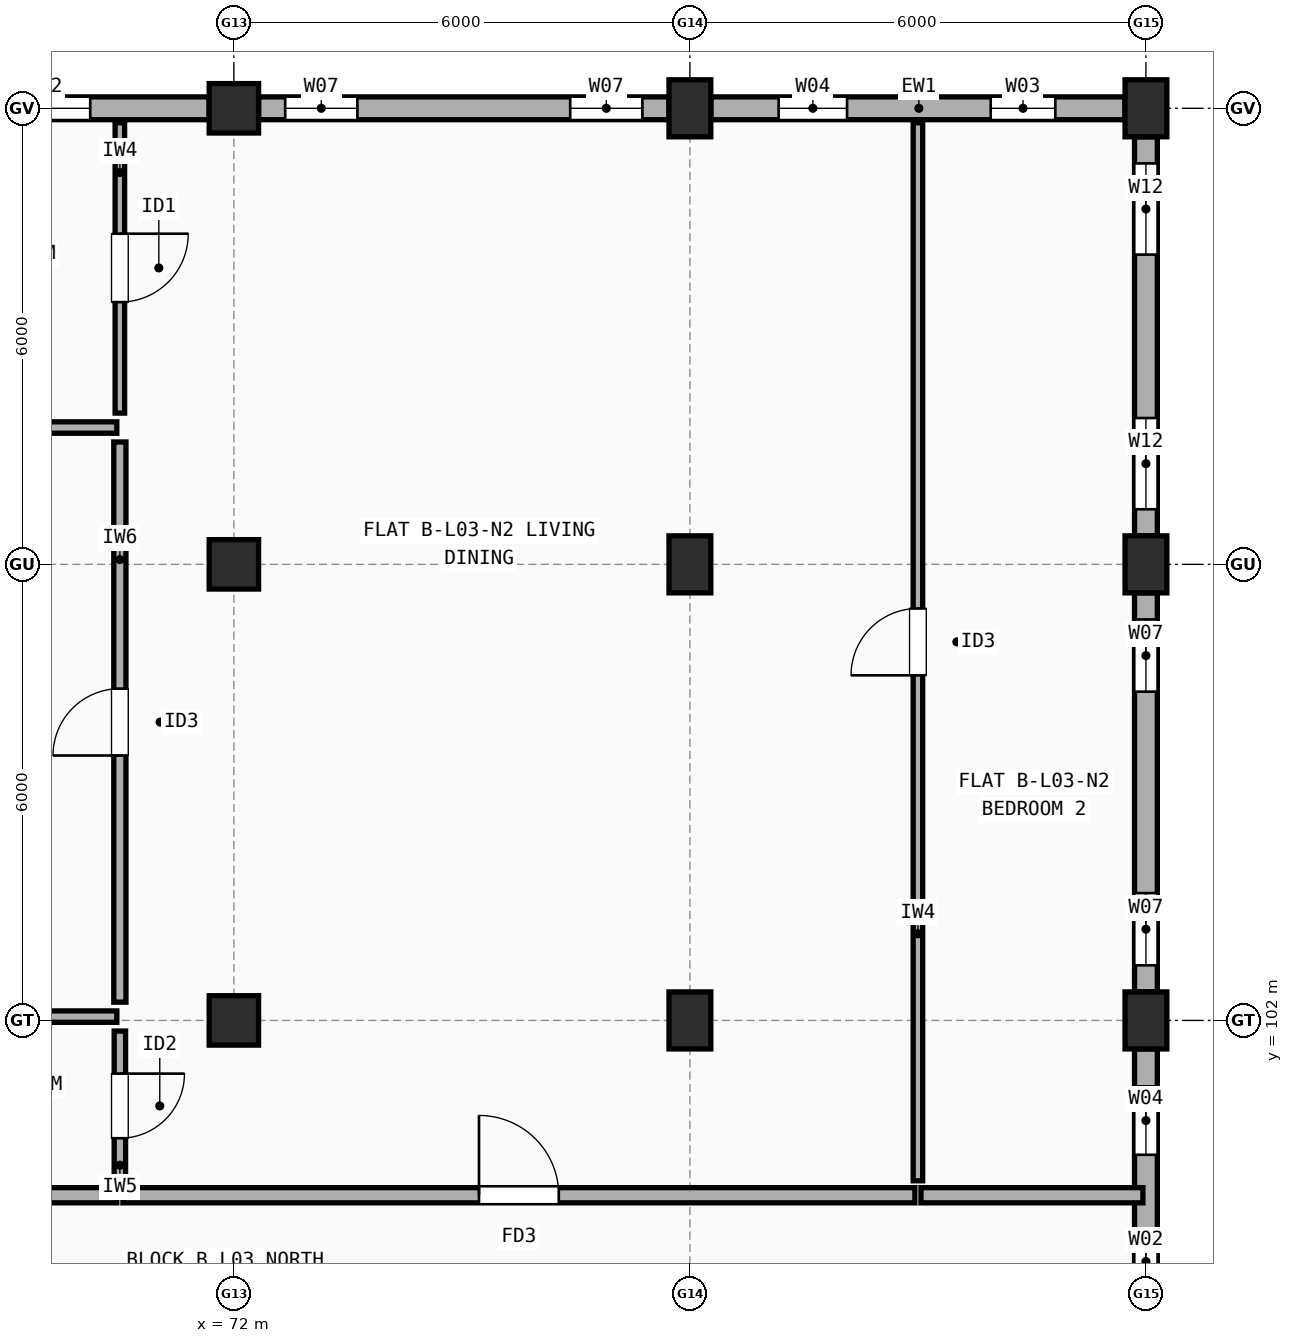
"""IFC4 building model, lengths in metres.
Left out: names, types, materials, properties, quantities, classifications, styles, units other than length and angle.
Written with IfcOpenShell. Run it as: python <this file> out.ifc"""

import sys

from ifc_helpers import new_model, si_unit, direction, frame, frame_2d, origin, origin_2d, place, context, subcontext, project, spatial, rectangle, extrude, element, fill, save


model = new_model("IFC4")
c1 = context("Model", 3, precision=1e-05, world=origin(), true_north=direction((0.0, 1.0)))
c2 = subcontext(c1, "Body", "Model", "MODEL_VIEW")
j1 = project(units=[si_unit("LENGTHUNIT", "METRE"), si_unit("PLANEANGLEUNIT", "RADIAN")], contexts=[c1])
p1 = place(None, origin())
s1 = spatial("IfcSite", under=j1, at=p1, CompositionType="ELEMENT")
p2 = place(p1, origin())
s2 = spatial("IfcBuilding", under=s1, at=p2, CompositionType="ELEMENT")
p3 = place(p2, frame((0.0, 0.0, 10.9)))
s3 = spatial("IfcBuildingStorey", under=s2, at=p3, CompositionType="ELEMENT", Elevation=10.9)
for number, where, z_axis, x_axis in (
    (1, (72.0, 102.0, 0.0), (0.0, 0.0, 1.0), (1.0, 0.0, 0.0)),
    (2, (72.0, 108.0, 0.0), (0.0, 0.0, 1.0), (1.0, 0.0, 0.0)),
    (3, (72.0, 114.0, 0.0), (0.0, 0.0, 1.0), (1.0, 0.0, 0.0)),
):
    element("IfcColumn", number, at=place(p3, frame(where, z_axis=z_axis, x_axis=x_axis)), inside=s3, PredefinedType="COLUMN", context=c2, shape_type="SweptSolid", body=[
        extrude(rectangle(XDim=0.65, YDim=0.65, at=origin_2d()), origin(), (0.0, 0.0, 1.0), 2.96),
    ])
for number, where, z_axis, x_axis in (
    (4, (78.0, 102.0, 0.0), (0.0, 0.0, 1.0), (1.0, 0.0, 0.0)),
    (5, (78.0, 108.0, 0.0), (0.0, 0.0, 1.0), (1.0, 0.0, 0.0)),
    (6, (78.0, 114.0, 0.0), (0.0, 0.0, 1.0), (1.0, 0.0, 0.0)),
    (7, (84.0, 102.0, 0.0), (0.0, 0.0, 1.0), (1.0, 0.0, 0.0)),
    (8, (84.0, 108.0, 0.0), (0.0, 0.0, 1.0), (1.0, 0.0, 0.0)),
    (9, (84.0, 114.0, 0.0), (0.0, 0.0, 1.0), (1.0, 0.0, 0.0)),
):
    element("IfcColumn", number, at=place(p3, frame(where, z_axis=z_axis, x_axis=x_axis)), inside=s3, PredefinedType="COLUMN", context=c2, shape_type="SweptSolid", body=[
        extrude(rectangle(XDim=0.55, YDim=0.75, at=origin_2d()), origin(), (0.0, 0.0, 1.0), 2.96),
    ])
p4 = place(p3, frame((84.0, 96.375, 0.0), z_axis=(0.0, 0.0, 1.0), x_axis=(0.0, 1.0, 0.0)))
e10 = element("IfcWall", 10, at=p4, inside=s3, PredefinedType="STANDARD", context=c2, shape_type="SweptSolid", body=[
    extrude(rectangle(XDim=5.25, YDim=0.3, at=frame_2d((2.625, 0.0))), origin(), (0.0, 0.0, 1.0), 2.442),
])
p5 = place(p4, frame((2.054, 0.0, 0.9)))
e11 = element("IfcOpeningElement", 11, at=p5, cuts=e10, PredefinedType="OPENING", context=c2, shape_type="SweptSolid", body=[
    extrude(rectangle(XDim=0.8, YDim=1.2, at=frame_2d((0.4, 0.6))), frame((0.0, 0.16, 0.0), z_axis=(0.0, -1.0, 0.0), x_axis=(1.0, 0.0, 0.0)), (0.0, 0.0, 1.0), 0.32),
])
p6 = place(p4, frame((3.857, 0.0, 0.9)))
e12 = element("IfcOpeningElement", 12, at=p6, cuts=e10, PredefinedType="OPENING", context=c2, shape_type="SweptSolid", body=[
    extrude(rectangle(XDim=0.9, YDim=1.3, at=frame_2d((0.45, 0.65))), frame((0.0, 0.16, 0.0), z_axis=(0.0, -1.0, 0.0), x_axis=(1.0, 0.0, 0.0)), (0.0, 0.0, 1.0), 0.32),
])
p7 = place(p3, frame((84.0, 102.375, 0.0), z_axis=(0.0, 0.0, 1.0), x_axis=(0.0, 1.0, 0.0)))
e13 = element("IfcWall", 13, at=p7, inside=s3, PredefinedType="STANDARD", context=c2, shape_type="SweptSolid", body=[
    extrude(rectangle(XDim=5.25, YDim=0.3, at=frame_2d((2.625, 0.0))), origin(), (0.0, 0.0, 1.0), 2.442),
])
p8 = place(p7, frame((0.35, 0.0, 0.9)))
e14 = element("IfcOpeningElement", 14, at=p8, cuts=e13, PredefinedType="OPENING", context=c2, shape_type="SweptSolid", body=[
    extrude(rectangle(XDim=0.95, YDim=1.35, at=frame_2d((0.475, 0.675))), frame((0.0, 0.16, 0.0), z_axis=(0.0, -1.0, 0.0), x_axis=(1.0, 0.0, 0.0)), (0.0, 0.0, 1.0), 0.32),
])
p9 = place(p7, frame((3.95, 0.0, 0.9)))
e15 = element("IfcOpeningElement", 15, at=p9, cuts=e13, PredefinedType="OPENING", context=c2, shape_type="SweptSolid", body=[
    extrude(rectangle(XDim=0.95, YDim=1.35, at=frame_2d((0.475, 0.675))), frame((0.0, 0.16, 0.0), z_axis=(0.0, -1.0, 0.0), x_axis=(1.0, 0.0, 0.0)), (0.0, 0.0, 1.0), 0.32),
])
p10 = place(p3, frame((84.0, 108.375, 0.0), z_axis=(0.0, 0.0, 1.0), x_axis=(0.0, 1.0, 0.0)))
e16 = element("IfcWall", 16, at=p10, inside=s3, PredefinedType="STANDARD", context=c2, shape_type="SweptSolid", body=[
    extrude(rectangle(XDim=5.25, YDim=0.3, at=frame_2d((2.625, 0.0))), origin(), (0.0, 0.0, 1.0), 2.442),
])
p11 = place(p10, frame((0.35, 0.0, 0.9)))
e17 = element("IfcOpeningElement", 17, at=p11, cuts=e16, PredefinedType="OPENING", context=c2, shape_type="SweptSolid", body=[
    extrude(rectangle(XDim=1.2, YDim=1.35, at=frame_2d((0.6, 0.675))), frame((0.0, 0.16, 0.0), z_axis=(0.0, -1.0, 0.0), x_axis=(1.0, 0.0, 0.0)), (0.0, 0.0, 1.0), 0.32),
])
p12 = place(p10, frame((3.7, 0.0, 0.9)))
e18 = element("IfcOpeningElement", 18, at=p12, cuts=e16, PredefinedType="OPENING", context=c2, shape_type="SweptSolid", body=[
    extrude(rectangle(XDim=1.2, YDim=1.35, at=frame_2d((0.6, 0.675))), frame((0.0, 0.16, 0.0), z_axis=(0.0, -1.0, 0.0), x_axis=(1.0, 0.0, 0.0)), (0.0, 0.0, 1.0), 0.32),
])
p13 = place(p3, frame((83.725, 114.0, 0.0), z_axis=(0.0, 0.0, 1.0), x_axis=(-1.0, 0.0, 0.0)))
e19 = element("IfcWall", 19, at=p13, inside=s3, PredefinedType="STANDARD", context=c2, shape_type="SweptSolid", body=[
    extrude(rectangle(XDim=5.45, YDim=0.3, at=frame_2d((2.725, 0.0))), origin(), (0.0, 0.0, 1.0), 2.442),
])
p14 = place(p13, frame((0.917, 0.0, 0.9)))
e20 = element("IfcOpeningElement", 20, at=p14, cuts=e19, PredefinedType="OPENING", context=c2, shape_type="SweptSolid", body=[
    extrude(rectangle(XDim=0.85, YDim=1.25, at=frame_2d((0.425, 0.625))), frame((0.0, 0.16, 0.0), z_axis=(0.0, -1.0, 0.0), x_axis=(1.0, 0.0, 0.0)), (0.0, 0.0, 1.0), 0.32),
])
p15 = place(p13, frame((3.657, 0.0, 0.9)))
e21 = element("IfcOpeningElement", 21, at=p15, cuts=e19, PredefinedType="OPENING", context=c2, shape_type="SweptSolid", body=[
    extrude(rectangle(XDim=0.9, YDim=1.3, at=frame_2d((0.45, 0.65))), frame((0.0, 0.16, 0.0), z_axis=(0.0, -1.0, 0.0), x_axis=(1.0, 0.0, 0.0)), (0.0, 0.0, 1.0), 0.32),
])
p16 = place(p3, frame((77.725, 114.0, 0.0), z_axis=(0.0, 0.0, 1.0), x_axis=(-1.0, 0.0, 0.0)))
e22 = element("IfcWall", 22, at=p16, inside=s3, PredefinedType="STANDARD", context=c2, shape_type="SweptSolid", body=[
    extrude(rectangle(XDim=5.4, YDim=0.3, at=frame_2d((2.7, 0.0))), origin(), (0.0, 0.0, 1.0), 2.442),
])
p17 = place(p16, frame((0.35, 0.0, 0.9)))
e23 = element("IfcOpeningElement", 23, at=p17, cuts=e22, PredefinedType="OPENING", context=c2, shape_type="SweptSolid", body=[
    extrude(rectangle(XDim=0.95, YDim=1.35, at=frame_2d((0.475, 0.675))), frame((0.0, 0.16, 0.0), z_axis=(0.0, -1.0, 0.0), x_axis=(1.0, 0.0, 0.0)), (0.0, 0.0, 1.0), 0.32),
])
p18 = place(p16, frame((4.1, 0.0, 0.9)))
e24 = element("IfcOpeningElement", 24, at=p18, cuts=e22, PredefinedType="OPENING", context=c2, shape_type="SweptSolid", body=[
    extrude(rectangle(XDim=0.95, YDim=1.35, at=frame_2d((0.475, 0.675))), frame((0.0, 0.16, 0.0), z_axis=(0.0, -1.0, 0.0), x_axis=(1.0, 0.0, 0.0)), (0.0, 0.0, 1.0), 0.32),
])
p19 = place(p3, frame((71.675, 114.0, 0.0), z_axis=(0.0, 0.0, 1.0), x_axis=(-1.0, 0.0, 0.0)))
e25 = element("IfcWall", 25, at=p19, inside=s3, PredefinedType="STANDARD", context=c2, shape_type="SweptSolid", body=[
    extrude(rectangle(XDim=5.35, YDim=0.3, at=frame_2d((2.675, 0.0))), origin(), (0.0, 0.0, 1.0), 2.442),
])
p20 = place(p19, frame((1.565, 0.0, 0.9)))
e26 = element("IfcOpeningElement", 26, at=p20, cuts=e25, PredefinedType="OPENING", context=c2, shape_type="SweptSolid", body=[
    extrude(rectangle(XDim=1.2, YDim=1.35, at=frame_2d((0.6, 0.675))), frame((0.0, 0.16, 0.0), z_axis=(0.0, -1.0, 0.0), x_axis=(1.0, 0.0, 0.0)), (0.0, 0.0, 1.0), 0.32),
])
p21 = place(p19, frame((3.8, 0.0, 0.9)))
e27 = element("IfcOpeningElement", 27, at=p21, cuts=e25, PredefinedType="OPENING", context=c2, shape_type="SweptSolid", body=[
    extrude(rectangle(XDim=1.2, YDim=1.35, at=frame_2d((0.6, 0.675))), frame((0.0, 0.16, 0.0), z_axis=(0.0, -1.0, 0.0), x_axis=(1.0, 0.0, 0.0)), (0.0, 0.0, 1.0), 0.32),
])
p22 = place(p3, frame((66.04, 99.7, 0.0), z_axis=(0.0, 0.0, 1.0), x_axis=(1.0, 0.0, 0.0)))
e28 = element("IfcWall", 28, at=p22, inside=s3, PredefinedType="SOLIDWALL", context=c2, shape_type="SweptSolid", body=[
    extrude(rectangle(XDim=4.42, YDim=0.2, at=frame_2d((2.21, 0.0))), origin(), (0.0, 0.0, 1.0), 2.96),
])
p23 = place(p3, frame((70.54, 99.7, 0.0), z_axis=(0.0, 0.0, 1.0), x_axis=(1.0, 0.0, 0.0)))
e29 = element("IfcWall", 29, at=p23, inside=s3, PredefinedType="SOLIDWALL", context=c2, shape_type="SweptSolid", body=[
    extrude(rectangle(XDim=10.42, YDim=0.2, at=frame_2d((5.21, 0.0))), origin(), (0.0, 0.0, 1.0), 2.442),
])
p24 = place(p23, frame((4.685, 0.0, 0.0)))
e30 = element("IfcOpeningElement", 30, at=p24, cuts=e29, PredefinedType="OPENING", context=c2, shape_type="SweptSolid", body=[
    extrude(rectangle(XDim=1.05, YDim=2.15, at=frame_2d((0.525, 1.075))), frame((0.0, 0.11, 0.0), z_axis=(0.0, -1.0, 0.0), x_axis=(1.0, 0.0, 0.0)), (0.0, 0.0, 1.0), 0.22),
])
p25 = place(p3, frame((70.5, 109.99, 0.0), z_axis=(0.0, 0.0, 1.0), x_axis=(0.0, 1.0, 0.0)))
e31 = element("IfcWall", 31, at=p25, inside=s3, PredefinedType="PARTITIONING", context=c2, shape_type="SweptSolid", body=[
    extrude(rectangle(XDim=3.82, YDim=0.125, at=frame_2d((1.91, 0.0))), origin(), (0.0, 0.0, 1.0), 2.96),
])
p26 = place(p25, frame((1.46, 0.0, 0.0)))
e32 = element("IfcOpeningElement", 32, at=p26, cuts=e31, PredefinedType="OPENING", context=c2, shape_type="SweptSolid", body=[
    extrude(rectangle(XDim=0.9, YDim=2.1, at=frame_2d((0.45, 1.05))), frame((0.0, 0.073, 0.0), z_axis=(0.0, -1.0, 0.0), x_axis=(1.0, 0.0, 0.0)), (0.0, 0.0, 1.0), 0.145),
])
p27 = place(p3, frame((70.5, 102.24, 0.0), z_axis=(0.0, 0.0, 1.0), x_axis=(0.0, 1.0, 0.0)))
e33 = element("IfcWall", 33, at=p27, inside=s3, PredefinedType="PLUMBINGWALL", context=c2, shape_type="SweptSolid", body=[
    extrude(rectangle(XDim=7.37, YDim=0.16, at=frame_2d((3.685, 0.0))), origin(), (0.0, 0.0, 1.0), 2.442),
])
p28 = place(p27, frame((3.245, 0.0, 0.0)))
e34 = element("IfcOpeningElement", 34, at=p28, cuts=e33, PredefinedType="OPENING", context=c2, shape_type="SweptSolid", body=[
    extrude(rectangle(XDim=0.88, YDim=2.1, at=frame_2d((0.44, 1.05))), frame((0.0, 0.09, 0.0), z_axis=(0.0, -1.0, 0.0), x_axis=(1.0, 0.0, 0.0)), (0.0, 0.0, 1.0), 0.18),
])
p29 = place(p3, frame((70.5, 99.89, 0.0), z_axis=(0.0, 0.0, 1.0), x_axis=(0.0, 1.0, 0.0)))
e35 = element("IfcWall", 35, at=p29, inside=s3, PredefinedType="PARTITIONING", context=c2, shape_type="SweptSolid", body=[
    extrude(rectangle(XDim=1.97, YDim=0.15, at=frame_2d((0.985, 0.0))), origin(), (0.0, 0.0, 1.0), 2.96),
])
p30 = place(p29, frame((0.56, 0.0, 0.0)))
e36 = element("IfcOpeningElement", 36, at=p30, cuts=e35, PredefinedType="OPENING", context=c2, shape_type="SweptSolid", body=[
    extrude(rectangle(XDim=0.85, YDim=2.1, at=frame_2d((0.425, 1.05))), frame((0.0, 0.085, 0.0), z_axis=(0.0, -1.0, 0.0), x_axis=(1.0, 0.0, 0.0)), (0.0, 0.0, 1.0), 0.17),
])
p31 = place(p3, frame((66.04, 109.8, 0.0), z_axis=(0.0, 0.0, 1.0), x_axis=(1.0, 0.0, 0.0)))
e37 = element("IfcWall", 37, at=p31, inside=s3, PredefinedType="PARTITIONING", context=c2, shape_type="SweptSolid", body=[
    extrude(rectangle(XDim=4.42, YDim=0.15, at=frame_2d((2.21, 0.0))), origin(), (0.0, 0.0, 1.0), 2.458),
])
p32 = place(p3, frame((66.36, 102.05, 0.0), z_axis=(0.0, 0.0, 1.0), x_axis=(1.0, 0.0, 0.0)))
e38 = element("IfcWall", 38, at=p32, inside=s3, PredefinedType="PARTITIONING", context=c2, shape_type="SweptSolid", body=[
    extrude(rectangle(XDim=4.1, YDim=0.15, at=frame_2d((2.05, 0.0))), origin(), (0.0, 0.0, 1.0), 2.442),
])
p33 = place(p3, frame((81.04, 99.7, 0.0), z_axis=(0.0, 0.0, 1.0), x_axis=(1.0, 0.0, 0.0)))
e39 = element("IfcWall", 39, at=p33, inside=s3, PredefinedType="SOLIDWALL", context=c2, shape_type="SweptSolid", body=[
    extrude(rectangle(XDim=2.92, YDim=0.2, at=frame_2d((1.46, 0.0))), origin(), (0.0, 0.0, 1.0), 2.442),
])
p34 = place(p3, frame((81.0, 99.89, 0.0), z_axis=(0.0, 0.0, 1.0), x_axis=(0.0, 1.0, 0.0)))
e40 = element("IfcWall", 40, at=p34, inside=s3, PredefinedType="PARTITIONING", context=c2, shape_type="SweptSolid", body=[
    extrude(rectangle(XDim=13.92, YDim=0.125, at=frame_2d((6.96, 0.0))), origin(), (0.0, 0.0, 1.0), 2.442),
])
p35 = place(p34, frame((6.65, 0.0, 0.0)))
e41 = element("IfcOpeningElement", 41, at=p35, cuts=e40, PredefinedType="OPENING", context=c2, shape_type="SweptSolid", body=[
    extrude(rectangle(XDim=0.88, YDim=2.1, at=frame_2d((0.44, 1.05))), frame((0.0, 0.073, 0.0), z_axis=(0.0, -1.0, 0.0), x_axis=(1.0, 0.0, 0.0)), (0.0, 0.0, 1.0), 0.145),
])
p36 = place(p5, origin())
e42 = element("IfcWindow", 42, at=p36, inside=s3, PartitioningType="SINGLE_PANEL", PredefinedType="WINDOW", context=c2, shape_type="SweptSolid", body=[
    extrude(rectangle(XDim=0.8, YDim=1.2, at=frame_2d((0.4, 0.6))), frame((0.0, 0.03, 0.0), z_axis=(0.0, -1.0, 0.0), x_axis=(1.0, 0.0, 0.0)), (0.0, 0.0, 1.0), 0.06),
])
fill(e11, e42)
p37 = place(p6, origin())
e43 = element("IfcWindow", 43, at=p37, inside=s3, PartitioningType="SINGLE_PANEL", PredefinedType="WINDOW", context=c2, shape_type="SweptSolid", body=[
    extrude(rectangle(XDim=0.9, YDim=1.3, at=frame_2d((0.45, 0.65))), frame((0.0, 0.03, 0.0), z_axis=(0.0, -1.0, 0.0), x_axis=(1.0, 0.0, 0.0)), (0.0, 0.0, 1.0), 0.06),
])
fill(e12, e43)
p38 = place(p8, origin())
e44 = element("IfcWindow", 44, at=p38, inside=s3, PartitioningType="SINGLE_PANEL", PredefinedType="WINDOW", context=c2, shape_type="SweptSolid", body=[
    extrude(rectangle(XDim=0.95, YDim=1.35, at=frame_2d((0.475, 0.675))), frame((0.0, 0.03, 0.0), z_axis=(0.0, -1.0, 0.0), x_axis=(1.0, 0.0, 0.0)), (0.0, 0.0, 1.0), 0.06),
])
fill(e14, e44)
p39 = place(p9, origin())
e45 = element("IfcWindow", 45, at=p39, inside=s3, PartitioningType="SINGLE_PANEL", PredefinedType="WINDOW", context=c2, shape_type="SweptSolid", body=[
    extrude(rectangle(XDim=0.95, YDim=1.35, at=frame_2d((0.475, 0.675))), frame((0.0, 0.03, 0.0), z_axis=(0.0, -1.0, 0.0), x_axis=(1.0, 0.0, 0.0)), (0.0, 0.0, 1.0), 0.06),
])
fill(e15, e45)
p40 = place(p11, origin())
e46 = element("IfcWindow", 46, at=p40, inside=s3, PartitioningType="SINGLE_PANEL", PredefinedType="WINDOW", context=c2, shape_type="SweptSolid", body=[
    extrude(rectangle(XDim=1.2, YDim=1.35, at=frame_2d((0.6, 0.675))), frame((0.0, 0.03, 0.0), z_axis=(0.0, -1.0, 0.0), x_axis=(1.0, 0.0, 0.0)), (0.0, 0.0, 1.0), 0.06),
])
fill(e17, e46)
p41 = place(p12, origin())
e47 = element("IfcWindow", 47, at=p41, inside=s3, PartitioningType="SINGLE_PANEL", PredefinedType="WINDOW", context=c2, shape_type="SweptSolid", body=[
    extrude(rectangle(XDim=1.2, YDim=1.35, at=frame_2d((0.6, 0.675))), frame((0.0, 0.03, 0.0), z_axis=(0.0, -1.0, 0.0), x_axis=(1.0, 0.0, 0.0)), (0.0, 0.0, 1.0), 0.06),
])
fill(e18, e47)
p42 = place(p14, origin())
e48 = element("IfcWindow", 48, at=p42, inside=s3, PartitioningType="SINGLE_PANEL", PredefinedType="WINDOW", context=c2, shape_type="SweptSolid", body=[
    extrude(rectangle(XDim=0.85, YDim=1.25, at=frame_2d((0.425, 0.625))), frame((0.0, 0.03, 0.0), z_axis=(0.0, -1.0, 0.0), x_axis=(1.0, 0.0, 0.0)), (0.0, 0.0, 1.0), 0.06),
])
fill(e20, e48)
p43 = place(p15, origin())
e49 = element("IfcWindow", 49, at=p43, inside=s3, PartitioningType="SINGLE_PANEL", PredefinedType="WINDOW", context=c2, shape_type="SweptSolid", body=[
    extrude(rectangle(XDim=0.9, YDim=1.3, at=frame_2d((0.45, 0.65))), frame((0.0, 0.03, 0.0), z_axis=(0.0, -1.0, 0.0), x_axis=(1.0, 0.0, 0.0)), (0.0, 0.0, 1.0), 0.06),
])
fill(e21, e49)
p44 = place(p17, origin())
e50 = element("IfcWindow", 50, at=p44, inside=s3, PartitioningType="SINGLE_PANEL", PredefinedType="WINDOW", context=c2, shape_type="SweptSolid", body=[
    extrude(rectangle(XDim=0.95, YDim=1.35, at=frame_2d((0.475, 0.675))), frame((0.0, 0.03, 0.0), z_axis=(0.0, -1.0, 0.0), x_axis=(1.0, 0.0, 0.0)), (0.0, 0.0, 1.0), 0.06),
])
fill(e23, e50)
p45 = place(p18, origin())
e51 = element("IfcWindow", 51, at=p45, inside=s3, PartitioningType="SINGLE_PANEL", PredefinedType="WINDOW", context=c2, shape_type="SweptSolid", body=[
    extrude(rectangle(XDim=0.95, YDim=1.35, at=frame_2d((0.475, 0.675))), frame((0.0, 0.03, 0.0), z_axis=(0.0, -1.0, 0.0), x_axis=(1.0, 0.0, 0.0)), (0.0, 0.0, 1.0), 0.06),
])
fill(e24, e51)
p46 = place(p20, origin())
e52 = element("IfcWindow", 52, at=p46, inside=s3, PartitioningType="SINGLE_PANEL", PredefinedType="WINDOW", context=c2, shape_type="SweptSolid", body=[
    extrude(rectangle(XDim=1.2, YDim=1.35, at=frame_2d((0.6, 0.675))), frame((0.0, 0.03, 0.0), z_axis=(0.0, -1.0, 0.0), x_axis=(1.0, 0.0, 0.0)), (0.0, 0.0, 1.0), 0.06),
])
fill(e26, e52)
p47 = place(p24, origin())
e53 = element("IfcDoor", 53, at=p47, inside=s3, OperationType="SINGLE_SWING_LEFT", PredefinedType="DOOR", context=c2, shape_type="SweptSolid", body=[
    extrude(rectangle(XDim=1.05, YDim=2.15, at=frame_2d((0.525, 1.075))), frame((0.0, 0.025, 0.0), z_axis=(0.0, -1.0, 0.0), x_axis=(1.0, 0.0, 0.0)), (0.0, 0.0, 1.0), 0.05),
])
fill(e30, e53)
p48 = place(p26, origin())
e54 = element("IfcDoor", 54, at=p48, inside=s3, OperationType="SINGLE_SWING_RIGHT", PredefinedType="DOOR", context=c2, shape_type="SweptSolid", body=[
    extrude(rectangle(XDim=0.9, YDim=2.1, at=frame_2d((0.45, 1.05))), frame((0.0, 0.025, 0.0), z_axis=(0.0, -1.0, 0.0), x_axis=(1.0, 0.0, 0.0)), (0.0, 0.0, 1.0), 0.05),
])
fill(e32, e54)
p49 = place(p28, origin())
e55 = element("IfcDoor", 55, at=p49, inside=s3, OperationType="SINGLE_SWING_LEFT", PredefinedType="DOOR", context=c2, shape_type="SweptSolid", body=[
    extrude(rectangle(XDim=0.88, YDim=2.1, at=frame_2d((0.44, 1.05))), frame((0.0, 0.025, 0.0), z_axis=(0.0, -1.0, 0.0), x_axis=(1.0, 0.0, 0.0)), (0.0, 0.0, 1.0), 0.05),
])
fill(e34, e55)
p50 = place(p30, origin())
e56 = element("IfcDoor", 56, at=p50, inside=s3, OperationType="SINGLE_SWING_RIGHT", PredefinedType="DOOR", context=c2, shape_type="SweptSolid", body=[
    extrude(rectangle(XDim=0.85, YDim=2.1, at=frame_2d((0.425, 1.05))), frame((0.0, 0.025, 0.0), z_axis=(0.0, -1.0, 0.0), x_axis=(1.0, 0.0, 0.0)), (0.0, 0.0, 1.0), 0.05),
])
fill(e36, e56)
p51 = place(p35, origin())
e57 = element("IfcDoor", 57, at=p51, inside=s3, OperationType="SINGLE_SWING_LEFT", PredefinedType="DOOR", context=c2, shape_type="SweptSolid", body=[
    extrude(rectangle(XDim=0.88, YDim=2.1, at=frame_2d((0.44, 1.05))), frame((0.0, 0.025, 0.0), z_axis=(0.0, -1.0, 0.0), x_axis=(1.0, 0.0, 0.0)), (0.0, 0.0, 1.0), 0.05),
])
fill(e41, e57)
save(model, sys.argv[1])
